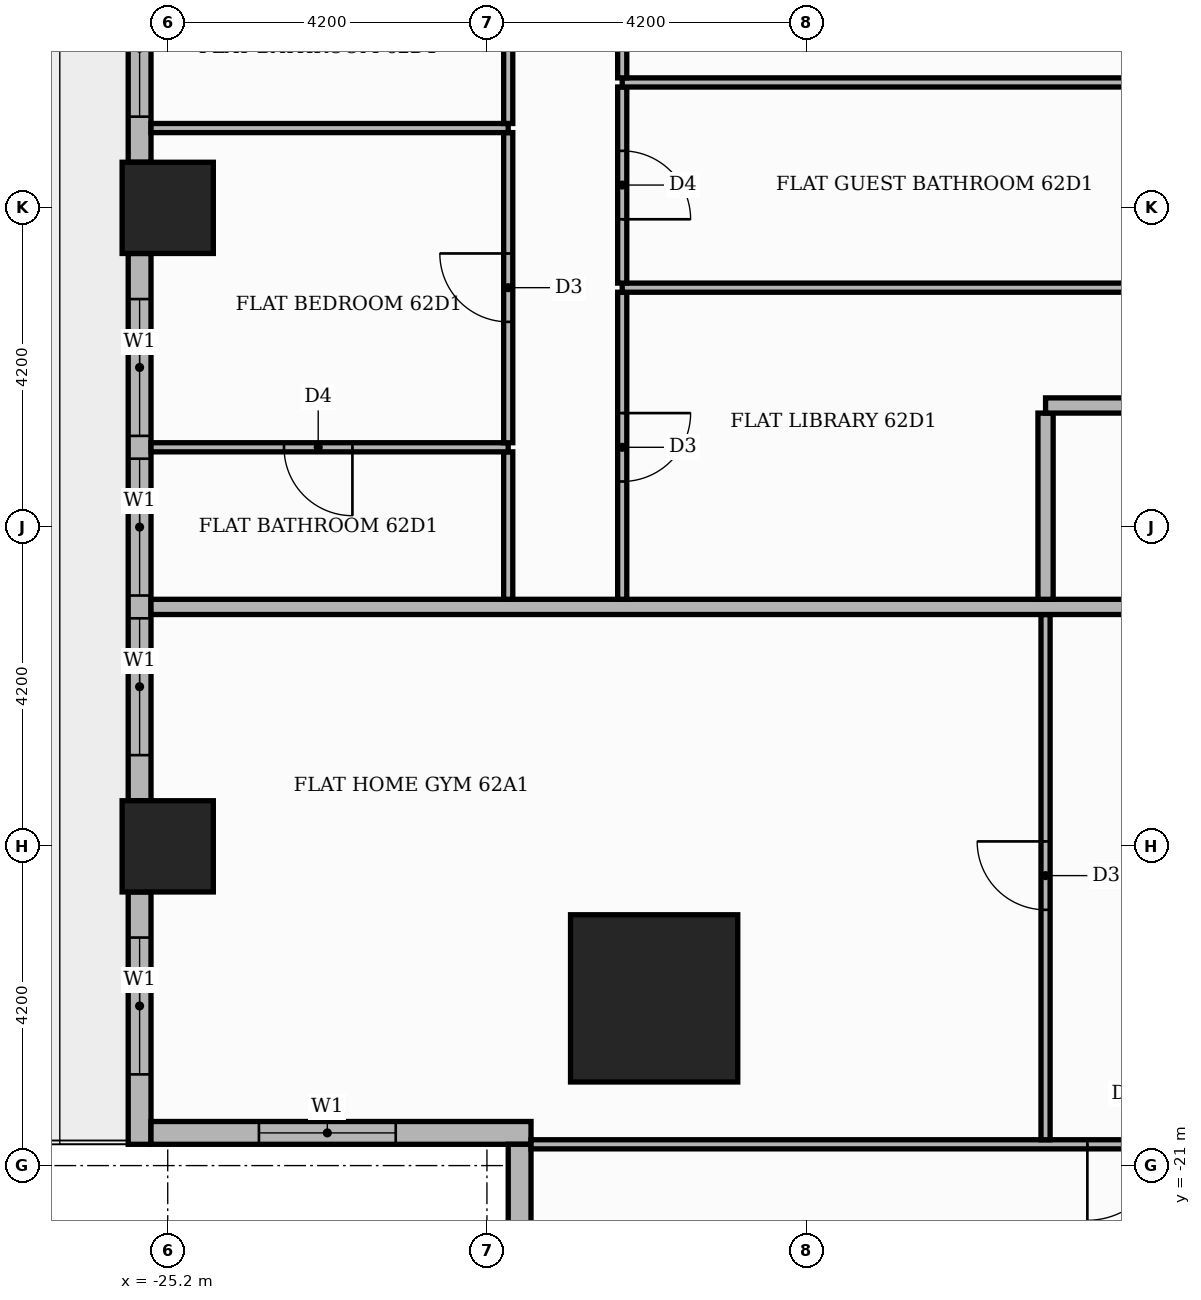
"""IFC4 building model, lengths in metres.
Left out: names, types, materials, properties, quantities, classifications, styles, units other than length and angle.
Written with IfcOpenShell. Run it as: python <this file> out.ifc"""

import sys

from ifc_helpers import new_model, si_unit, direction, frame, frame_2d, origin, origin_2d, place, context, subcontext, project, spatial, rectangle, extrude, element, fill, save


model = new_model("IFC4")
c1 = context("Model", 3, precision=1e-05, world=origin(), true_north=direction((0.0, 1.0)))
c2 = subcontext(c1, "Body", "Model", "MODEL_VIEW")
j1 = project(units=[si_unit("LENGTHUNIT", "METRE"), si_unit("PLANEANGLEUNIT", "RADIAN")], contexts=[c1])
p1 = place(None, origin())
s1 = spatial("IfcSite", under=j1, at=p1, CompositionType="ELEMENT")
p2 = place(p1, origin())
s2 = spatial("IfcBuilding", under=s1, at=p2, CompositionType="ELEMENT")
p3 = place(p2, frame((0.0, 0.0, 260.1)))
s3 = spatial("IfcBuildingStorey", under=s2, at=p3, CompositionType="ELEMENT", Elevation=260.1)
p4 = place(p3, frame((-18.8, -18.8, 0.0), z_axis=(0.0, 0.0, 1.0), x_axis=(1.0, 0.0, 0.0)))
e1 = element("IfcColumn", 1, at=p4, inside=s3, PredefinedType="COLUMN", context=c2, shape_type="SweptSolid", body=[
    extrude(rectangle(XDim=2.2, YDim=2.2, at=origin_2d()), origin(), (0.0, 0.0, 1.0), 3.9),
])
for number, where, z_axis, x_axis in (
    (2, (-25.2, -8.4, 0.0), (0.0, 0.0, 1.0), (1.0, 0.0, 0.0)),
    (3, (-25.2, -16.8, 0.0), (0.0, 0.0, 1.0), (1.0, 0.0, 0.0)),
):
    element("IfcColumn", number, at=place(p3, frame(where, z_axis=z_axis, x_axis=x_axis)), inside=s3, PredefinedType="COLUMN", context=c2, shape_type="SweptSolid", body=[
        extrude(rectangle(XDim=1.2, YDim=1.2, at=origin_2d()), origin(), (0.0, 0.0, 1.0), 3.9),
    ])
p5 = place(p3, frame((-25.57, -0.6, 0.0), z_axis=(0.0, 0.0, 1.0), x_axis=(0.0, -1.0, 0.0)))
e4 = element("IfcWall", 4, at=p5, inside=s3, PredefinedType="STANDARD", context=c2, shape_type="SweptSolid", body=[
    extrude(rectangle(XDim=7.2, YDim=0.3, at=frame_2d((3.6, 0.0))), origin(), (0.0, 0.0, 1.0), 3.48),
])
p6 = place(p5, frame((0.6, 0.0, 0.9)))
e5 = element("IfcOpeningElement", 5, at=p6, cuts=e4, PredefinedType="OPENING", context=c2, shape_type="SweptSolid", body=[
    extrude(rectangle(XDim=3.9, YDim=2.1, at=frame_2d((1.95, 1.05))), frame((0.0, 0.16, 0.0), z_axis=(0.0, -1.0, 0.0), x_axis=(1.0, 0.0, 0.0)), (0.0, 0.0, 1.0), 0.32),
])
p7 = place(p5, frame((4.8, 0.0, 0.9)))
e6 = element("IfcOpeningElement", 6, at=p7, cuts=e4, PredefinedType="OPENING", context=c2, shape_type="SweptSolid", body=[
    extrude(rectangle(XDim=1.8, YDim=2.1, at=frame_2d((0.9, 1.05))), frame((0.0, 0.16, 0.0), z_axis=(0.0, -1.0, 0.0), x_axis=(1.0, 0.0, 0.0)), (0.0, 0.0, 1.0), 0.32),
])
p8 = place(p3, frame((-25.57, -9.0, 0.0), z_axis=(0.0, 0.0, 1.0), x_axis=(0.0, -1.0, 0.0)))
e7 = element("IfcWall", 7, at=p8, inside=s3, PredefinedType="STANDARD", context=c2, shape_type="SweptSolid", body=[
    extrude(rectangle(XDim=7.2, YDim=0.3, at=frame_2d((3.6, 0.0))), origin(), (0.0, 0.0, 1.0), 3.48),
])
p9 = place(p8, frame((0.6, 0.0, 0.9)))
e8 = element("IfcOpeningElement", 8, at=p9, cuts=e7, PredefinedType="OPENING", context=c2, shape_type="SweptSolid", body=[
    extrude(rectangle(XDim=1.8, YDim=2.1, at=frame_2d((0.9, 1.05))), frame((0.0, 0.16, 0.0), z_axis=(0.0, -1.0, 0.0), x_axis=(1.0, 0.0, 0.0)), (0.0, 0.0, 1.0), 0.32),
])
p10 = place(p8, frame((2.7, 0.0, 0.9)))
e9 = element("IfcOpeningElement", 9, at=p10, cuts=e7, PredefinedType="OPENING", context=c2, shape_type="SweptSolid", body=[
    extrude(rectangle(XDim=1.8, YDim=2.1, at=frame_2d((0.9, 1.05))), frame((0.0, 0.16, 0.0), z_axis=(0.0, -1.0, 0.0), x_axis=(1.0, 0.0, 0.0)), (0.0, 0.0, 1.0), 0.32),
])
p11 = place(p8, frame((4.8, 0.0, 0.9)))
e10 = element("IfcOpeningElement", 10, at=p11, cuts=e7, PredefinedType="OPENING", context=c2, shape_type="SweptSolid", body=[
    extrude(rectangle(XDim=1.8, YDim=2.1, at=frame_2d((0.9, 1.05))), frame((0.0, 0.16, 0.0), z_axis=(0.0, -1.0, 0.0), x_axis=(1.0, 0.0, 0.0)), (0.0, 0.0, 1.0), 0.32),
])
p12 = place(p3, frame((-25.57, -17.4, 0.0), z_axis=(0.0, 0.0, 1.0), x_axis=(0.0, -1.0, 0.0)))
e11 = element("IfcWall", 11, at=p12, inside=s3, PredefinedType="STANDARD", context=c2, shape_type="SweptSolid", body=[
    extrude(rectangle(XDim=3.32, YDim=0.3, at=frame_2d((1.66, 0.0))), origin(), (0.0, 0.0, 1.0), 3.48),
])
p13 = place(p12, frame((0.6, 0.0, 0.9)))
e12 = element("IfcOpeningElement", 12, at=p13, cuts=e11, PredefinedType="OPENING", context=c2, shape_type="SweptSolid", body=[
    extrude(rectangle(XDim=1.8, YDim=2.1, at=frame_2d((0.9, 1.05))), frame((0.0, 0.16, 0.0), z_axis=(0.0, -1.0, 0.0), x_axis=(1.0, 0.0, 0.0)), (0.0, 0.0, 1.0), 0.32),
])
p14 = place(p3, frame((-25.42, -20.57, 0.0), z_axis=(0.0, 0.0, 1.0), x_axis=(1.0, 0.0, 0.0)))
e13 = element("IfcWall", 13, at=p14, inside=s3, PredefinedType="STANDARD", context=c2, shape_type="SweptSolid", body=[
    extrude(rectangle(XDim=5.0, YDim=0.3, at=frame_2d((2.5, 0.0))), origin(), (0.0, 0.0, 1.0), 3.48),
])
p15 = place(p14, frame((1.42, 0.0, 0.9)))
e14 = element("IfcOpeningElement", 14, at=p15, cuts=e13, PredefinedType="OPENING", context=c2, shape_type="SweptSolid", body=[
    extrude(rectangle(XDim=1.8, YDim=2.1, at=frame_2d((0.9, 1.05))), frame((0.0, 0.16, 0.0), z_axis=(0.0, -1.0, 0.0), x_axis=(1.0, 0.0, 0.0)), (0.0, 0.0, 1.0), 0.32),
])
p16 = place(p3, frame((-20.57, -20.72, 0.0), z_axis=(0.0, 0.0, 1.0), x_axis=(0.0, -1.0, 0.0)))
e15 = element("IfcWall", 15, at=p16, inside=s3, PredefinedType="STANDARD", context=c2, shape_type="SweptSolid", body=[
    extrude(rectangle(XDim=5.0, YDim=0.3, at=frame_2d((2.5, 0.0))), origin(), (0.0, 0.0, 1.0), 3.48),
])
p17 = place(p16, frame((1.48, 0.0, 0.9)))
e16 = element("IfcOpeningElement", 16, at=p17, cuts=e15, PredefinedType="OPENING", context=c2, shape_type="SweptSolid", body=[
    extrude(rectangle(XDim=1.8, YDim=2.1, at=frame_2d((0.9, 1.05))), frame((0.0, 0.16, 0.0), z_axis=(0.0, -1.0, 0.0), x_axis=(1.0, 0.0, 0.0)), (0.0, 0.0, 1.0), 0.32),
])
p18 = place(p3, frame((-20.42, -20.72, 0.0), z_axis=(0.0, 0.0, 1.0), x_axis=(1.0, 0.0, 0.0)))
e17 = element("IfcWall", 17, at=p18, inside=s3, PredefinedType="PARTITIONING", context=c2, shape_type="SweptSolid", body=[
    extrude(rectangle(XDim=12.77, YDim=0.12, at=frame_2d((6.385, 0.0))), origin(), (0.0, 0.0, 1.0), 3.48),
])
p19 = place(p18, frame((7.32, 0.0, 0.0)))
e18 = element("IfcOpeningElement", 18, at=p19, cuts=e17, PredefinedType="OPENING", context=c2, shape_type="SweptSolid", body=[
    extrude(rectangle(XDim=1.0, YDim=2.1, at=frame_2d((0.5, 1.05))), frame((0.0, 0.07, 0.0), z_axis=(0.0, -1.0, 0.0), x_axis=(1.0, 0.0, 0.0)), (0.0, 0.0, 1.0), 0.14),
])
p20 = place(p18, frame((10.47, 0.0, 0.0)))
e19 = element("IfcOpeningElement", 19, at=p20, cuts=e17, PredefinedType="OPENING", context=c2, shape_type="SweptSolid", body=[
    extrude(rectangle(XDim=1.0, YDim=2.1, at=frame_2d((0.5, 1.05))), frame((0.0, 0.07, 0.0), z_axis=(0.0, -1.0, 0.0), x_axis=(1.0, 0.0, 0.0)), (0.0, 0.0, 1.0), 0.14),
])
p21 = place(p3, frame((-13.65, -20.66, 0.0), z_axis=(0.0, 0.0, 1.0), x_axis=(0.0, 1.0, 0.0)))
e20 = element("IfcWall", 20, at=p21, inside=s3, PredefinedType="PARTITIONING", context=c2, shape_type="SweptSolid", body=[
    extrude(rectangle(XDim=6.91, YDim=0.12, at=frame_2d((3.455, 0.0))), origin(), (0.0, 0.0, 1.0), 3.48),
])
p22 = place(p21, frame((3.025, 0.0, 0.0)))
e21 = element("IfcOpeningElement", 21, at=p22, cuts=e20, PredefinedType="OPENING", context=c2, shape_type="SweptSolid", body=[
    extrude(rectangle(XDim=0.9, YDim=2.1, at=frame_2d((0.45, 1.05))), frame((0.0, 0.07, 0.0), z_axis=(0.0, -1.0, 0.0), x_axis=(1.0, 0.0, 0.0)), (0.0, 0.0, 1.0), 0.14),
])
p23 = place(p3, frame((-25.42, -13.65, 0.0), z_axis=(0.0, 0.0, 1.0), x_axis=(1.0, 0.0, 0.0)))
e22 = element("IfcWall", 22, at=p23, inside=s3, PredefinedType="PARTITIONING", context=c2, shape_type="SweptSolid", body=[
    extrude(rectangle(XDim=39.07, YDim=0.2, at=frame_2d((19.535, 0.0))), origin(), (0.0, 0.0, 1.0), 3.48),
])
p24 = place(p23, frame((14.37, 0.0, 0.0)))
e23 = element("IfcOpeningElement", 23, at=p24, cuts=e22, PredefinedType="OPENING", context=c2, shape_type="SweptSolid", body=[
    extrude(rectangle(XDim=1.1, YDim=2.4, at=frame_2d((0.55, 1.2))), frame((0.0, 0.11, 0.0), z_axis=(0.0, -1.0, 0.0), x_axis=(1.0, 0.0, 0.0)), (0.0, 0.0, 1.0), 0.22),
])
p25 = place(p3, frame((-20.72, -13.55, 0.0), z_axis=(0.0, 0.0, 1.0), x_axis=(0.0, 1.0, 0.0)))
e24 = element("IfcWall", 24, at=p25, inside=s3, PredefinedType="PARTITIONING", context=c2, shape_type="SweptSolid", body=[
    extrude(rectangle(XDim=1.94, YDim=0.12, at=frame_2d((0.97, 0.0))), origin(), (0.0, 0.0, 1.0), 3.48),
])
p26 = place(p3, frame((-19.22, -13.55, 0.0), z_axis=(0.0, 0.0, 1.0), x_axis=(0.0, 1.0, 0.0)))
e25 = element("IfcWall", 25, at=p26, inside=s3, PredefinedType="PARTITIONING", context=c2, shape_type="SweptSolid", body=[
    extrude(rectangle(XDim=4.04, YDim=0.12, at=frame_2d((2.02, 0.0))), origin(), (0.0, 0.0, 1.0), 3.48),
])
p27 = place(p26, frame((1.55, 0.0, 0.0)))
e26 = element("IfcOpeningElement", 26, at=p27, cuts=e25, PredefinedType="OPENING", context=c2, shape_type="SweptSolid", body=[
    extrude(rectangle(XDim=0.9, YDim=2.1, at=frame_2d((0.45, 1.05))), frame((0.0, 0.07, 0.0), z_axis=(0.0, -1.0, 0.0), x_axis=(1.0, 0.0, 0.0)), (0.0, 0.0, 1.0), 0.14),
])
p28 = place(p3, frame((-13.65, -13.55, 0.0), z_axis=(0.0, 0.0, 1.0), x_axis=(0.0, 1.0, 0.0)))
e27 = element("IfcWall", 27, at=p28, inside=s3, PredefinedType="PARTITIONING", context=c2, shape_type="SweptSolid", body=[
    extrude(rectangle(XDim=2.45, YDim=0.2, at=frame_2d((1.225, 0.0))), origin(), (0.0, 0.0, 1.0), 3.48),
])
p29 = place(p3, frame((-25.42, -11.55, 0.0), z_axis=(0.0, 0.0, 1.0), x_axis=(1.0, 0.0, 0.0)))
e28 = element("IfcWall", 28, at=p29, inside=s3, PredefinedType="PARTITIONING", context=c2, shape_type="SweptSolid", body=[
    extrude(rectangle(XDim=4.7, YDim=0.12, at=frame_2d((2.35, 0.0))), origin(), (0.0, 0.0, 1.0), 3.48),
])
p30 = place(p29, frame((1.75, 0.0, 0.0)))
e29 = element("IfcOpeningElement", 29, at=p30, cuts=e28, PredefinedType="OPENING", context=c2, shape_type="SweptSolid", body=[
    extrude(rectangle(XDim=0.9, YDim=2.1, at=frame_2d((0.45, 1.05))), frame((0.0, 0.07, 0.0), z_axis=(0.0, -1.0, 0.0), x_axis=(1.0, 0.0, 0.0)), (0.0, 0.0, 1.0), 0.14),
])
p31 = place(p3, frame((-20.72, -11.49, 0.0), z_axis=(0.0, 0.0, 1.0), x_axis=(0.0, 1.0, 0.0)))
e30 = element("IfcWall", 30, at=p31, inside=s3, PredefinedType="PARTITIONING", context=c2, shape_type="SweptSolid", body=[
    extrude(rectangle(XDim=4.08, YDim=0.12, at=frame_2d((2.04, 0.0))), origin(), (0.0, 0.0, 1.0), 3.48),
])
p32 = place(p31, frame((1.59, 0.0, 0.0)))
e31 = element("IfcOpeningElement", 31, at=p32, cuts=e30, PredefinedType="OPENING", context=c2, shape_type="SweptSolid", body=[
    extrude(rectangle(XDim=0.9, YDim=2.1, at=frame_2d((0.45, 1.05))), frame((0.0, 0.07, 0.0), z_axis=(0.0, -1.0, 0.0), x_axis=(1.0, 0.0, 0.0)), (0.0, 0.0, 1.0), 0.14),
])
p33 = place(p3, frame((-13.65, -11.0, 0.0), z_axis=(0.0, 0.0, 1.0), x_axis=(1.0, 0.0, 0.0)))
e32 = element("IfcWall", 32, at=p33, inside=s3, PredefinedType="PARTITIONING", context=c2, shape_type="SweptSolid", body=[
    extrude(rectangle(XDim=2.65, YDim=0.2, at=frame_2d((1.325, 0.0))), origin(), (0.0, 0.0, 1.0), 3.48),
])
p34 = place(p3, frame((-19.22, -9.45, 0.0), z_axis=(0.0, 0.0, 1.0), x_axis=(1.0, 0.0, 0.0)))
e33 = element("IfcWall", 33, at=p34, inside=s3, PredefinedType="PARTITIONING", context=c2, shape_type="SweptSolid", body=[
    extrude(rectangle(XDim=8.22, YDim=0.12, at=frame_2d((4.11, 0.0))), origin(), (0.0, 0.0, 1.0), 3.48),
])
p35 = place(p3, frame((-19.22, -9.39, 0.0), z_axis=(0.0, 0.0, 1.0), x_axis=(0.0, 1.0, 0.0)))
e34 = element("IfcWall", 34, at=p35, inside=s3, PredefinedType="PARTITIONING", context=c2, shape_type="SweptSolid", body=[
    extrude(rectangle(XDim=2.58, YDim=0.12, at=frame_2d((1.29, 0.0))), origin(), (0.0, 0.0, 1.0), 3.48),
])
p36 = place(p35, frame((0.84, 0.0, 0.0)))
e35 = element("IfcOpeningElement", 35, at=p36, cuts=e34, PredefinedType="OPENING", context=c2, shape_type="SweptSolid", body=[
    extrude(rectangle(XDim=0.9, YDim=2.1, at=frame_2d((0.45, 1.05))), frame((0.0, 0.07, 0.0), z_axis=(0.0, -1.0, 0.0), x_axis=(1.0, 0.0, 0.0)), (0.0, 0.0, 1.0), 0.14),
])
p37 = place(p3, frame((-25.42, -7.35, 0.0), z_axis=(0.0, 0.0, 1.0), x_axis=(1.0, 0.0, 0.0)))
e36 = element("IfcWall", 36, at=p37, inside=s3, PredefinedType="PARTITIONING", context=c2, shape_type="SweptSolid", body=[
    extrude(rectangle(XDim=4.7, YDim=0.12, at=frame_2d((2.35, 0.0))), origin(), (0.0, 0.0, 1.0), 3.48),
])
p38 = place(p3, frame((-20.72, -7.29, 0.0), z_axis=(0.0, 0.0, 1.0), x_axis=(0.0, 1.0, 0.0)))
e37 = element("IfcWall", 37, at=p38, inside=s3, PredefinedType="PARTITIONING", context=c2, shape_type="SweptSolid", body=[
    extrude(rectangle(XDim=1.98, YDim=0.12, at=frame_2d((0.99, 0.0))), origin(), (0.0, 0.0, 1.0), 3.48),
])
p39 = place(p3, frame((-19.22, -6.75, 0.0), z_axis=(0.0, 0.0, 1.0), x_axis=(1.0, 0.0, 0.0)))
e38 = element("IfcWall", 38, at=p39, inside=s3, PredefinedType="PARTITIONING", context=c2, shape_type="SweptSolid", body=[
    extrude(rectangle(XDim=8.22, YDim=0.12, at=frame_2d((4.11, 0.0))), origin(), (0.0, 0.0, 1.0), 3.48),
])
p40 = place(p3, frame((-19.22, -6.69, 0.0), z_axis=(0.0, 0.0, 1.0), x_axis=(0.0, 1.0, 0.0)))
e39 = element("IfcWall", 39, at=p40, inside=s3, PredefinedType="PARTITIONING", context=c2, shape_type="SweptSolid", body=[
    extrude(rectangle(XDim=3.18, YDim=0.12, at=frame_2d((1.59, 0.0))), origin(), (0.0, 0.0, 1.0), 3.48),
])
p41 = place(p40, frame((1.14, 0.0, 0.0)))
e40 = element("IfcOpeningElement", 40, at=p41, cuts=e39, PredefinedType="OPENING", context=c2, shape_type="SweptSolid", body=[
    extrude(rectangle(XDim=0.9, YDim=2.1, at=frame_2d((0.45, 1.05))), frame((0.0, 0.07, 0.0), z_axis=(0.0, -1.0, 0.0), x_axis=(1.0, 0.0, 0.0)), (0.0, 0.0, 1.0), 0.14),
])
p42 = place(p7, origin())
e41 = element("IfcWindow", 41, at=p42, inside=s3, PartitioningType="SINGLE_PANEL", PredefinedType="WINDOW", context=c2, shape_type="SweptSolid", body=[
    extrude(rectangle(XDim=1.8, YDim=2.1, at=frame_2d((0.9, 1.05))), frame((0.0, 0.03, 0.0), z_axis=(0.0, -1.0, 0.0), x_axis=(1.0, 0.0, 0.0)), (0.0, 0.0, 1.0), 0.06),
])
fill(e6, e41)
p43 = place(p9, origin())
e42 = element("IfcWindow", 42, at=p43, inside=s3, PartitioningType="SINGLE_PANEL", PredefinedType="WINDOW", context=c2, shape_type="SweptSolid", body=[
    extrude(rectangle(XDim=1.8, YDim=2.1, at=frame_2d((0.9, 1.05))), frame((0.0, 0.03, 0.0), z_axis=(0.0, -1.0, 0.0), x_axis=(1.0, 0.0, 0.0)), (0.0, 0.0, 1.0), 0.06),
])
fill(e8, e42)
p44 = place(p10, origin())
e43 = element("IfcWindow", 43, at=p44, inside=s3, PartitioningType="SINGLE_PANEL", PredefinedType="WINDOW", context=c2, shape_type="SweptSolid", body=[
    extrude(rectangle(XDim=1.8, YDim=2.1, at=frame_2d((0.9, 1.05))), frame((0.0, 0.03, 0.0), z_axis=(0.0, -1.0, 0.0), x_axis=(1.0, 0.0, 0.0)), (0.0, 0.0, 1.0), 0.06),
])
fill(e9, e43)
p45 = place(p11, origin())
e44 = element("IfcWindow", 44, at=p45, inside=s3, PartitioningType="SINGLE_PANEL", PredefinedType="WINDOW", context=c2, shape_type="SweptSolid", body=[
    extrude(rectangle(XDim=1.8, YDim=2.1, at=frame_2d((0.9, 1.05))), frame((0.0, 0.03, 0.0), z_axis=(0.0, -1.0, 0.0), x_axis=(1.0, 0.0, 0.0)), (0.0, 0.0, 1.0), 0.06),
])
fill(e10, e44)
p46 = place(p13, origin())
e45 = element("IfcWindow", 45, at=p46, inside=s3, PartitioningType="SINGLE_PANEL", PredefinedType="WINDOW", context=c2, shape_type="SweptSolid", body=[
    extrude(rectangle(XDim=1.8, YDim=2.1, at=frame_2d((0.9, 1.05))), frame((0.0, 0.03, 0.0), z_axis=(0.0, -1.0, 0.0), x_axis=(1.0, 0.0, 0.0)), (0.0, 0.0, 1.0), 0.06),
])
fill(e12, e45)
p47 = place(p15, origin())
e46 = element("IfcWindow", 46, at=p47, inside=s3, PartitioningType="SINGLE_PANEL", PredefinedType="WINDOW", context=c2, shape_type="SweptSolid", body=[
    extrude(rectangle(XDim=1.8, YDim=2.1, at=frame_2d((0.9, 1.05))), frame((0.0, 0.03, 0.0), z_axis=(0.0, -1.0, 0.0), x_axis=(1.0, 0.0, 0.0)), (0.0, 0.0, 1.0), 0.06),
])
fill(e14, e46)
p48 = place(p22, origin())
e47 = element("IfcDoor", 47, at=p48, inside=s3, OperationType="SINGLE_SWING_RIGHT", PredefinedType="DOOR", context=c2, shape_type="SweptSolid", body=[
    extrude(rectangle(XDim=0.9, YDim=2.1, at=frame_2d((0.45, 1.05))), frame((0.0, 0.025, 0.0), z_axis=(0.0, -1.0, 0.0), x_axis=(1.0, 0.0, 0.0)), (0.0, 0.0, 1.0), 0.05),
])
fill(e21, e47)
p49 = place(p19, frame((1.0, 0.0, 0.0), z_axis=(0.0, 0.0, 1.0), x_axis=(-1.0, 0.0, 0.0)))
e48 = element("IfcDoor", 48, at=p49, inside=s3, OperationType="SINGLE_SWING_LEFT", PredefinedType="DOOR", context=c2, shape_type="SweptSolid", body=[
    extrude(rectangle(XDim=1.0, YDim=2.1, at=frame_2d((0.5, 1.05))), frame((0.0, 0.025, 0.0), z_axis=(0.0, -1.0, 0.0), x_axis=(1.0, 0.0, 0.0)), (0.0, 0.0, 1.0), 0.05),
])
fill(e18, e48)
p50 = place(p36, frame((0.9, 0.0, 0.0), z_axis=(0.0, 0.0, 1.0), x_axis=(-1.0, 0.0, 0.0)))
e49 = element("IfcDoor", 49, at=p50, inside=s3, OperationType="SINGLE_SWING_LEFT", PredefinedType="DOOR", context=c2, shape_type="SweptSolid", body=[
    extrude(rectangle(XDim=0.9, YDim=2.1, at=frame_2d((0.45, 1.05))), frame((0.0, 0.025, 0.0), z_axis=(0.0, -1.0, 0.0), x_axis=(1.0, 0.0, 0.0)), (0.0, 0.0, 1.0), 0.05),
])
fill(e35, e49)
p51 = place(p27, frame((0.9, 0.0, 0.0), z_axis=(0.0, 0.0, 1.0), x_axis=(-1.0, 0.0, 0.0)))
e50 = element("IfcDoor", 50, at=p51, inside=s3, OperationType="SINGLE_SWING_RIGHT", PredefinedType="DOOR", context=c2, shape_type="SweptSolid", body=[
    extrude(rectangle(XDim=0.9, YDim=2.1, at=frame_2d((0.45, 1.05))), frame((0.0, 0.025, 0.0), z_axis=(0.0, -1.0, 0.0), x_axis=(1.0, 0.0, 0.0)), (0.0, 0.0, 1.0), 0.05),
])
fill(e26, e50)
p52 = place(p32, origin())
e51 = element("IfcDoor", 51, at=p52, inside=s3, OperationType="SINGLE_SWING_RIGHT", PredefinedType="DOOR", context=c2, shape_type="SweptSolid", body=[
    extrude(rectangle(XDim=0.9, YDim=2.1, at=frame_2d((0.45, 1.05))), frame((0.0, 0.025, 0.0), z_axis=(0.0, -1.0, 0.0), x_axis=(1.0, 0.0, 0.0)), (0.0, 0.0, 1.0), 0.05),
])
fill(e31, e51)
p53 = place(p30, frame((0.9, 0.0, 0.0), z_axis=(0.0, 0.0, 1.0), x_axis=(-1.0, 0.0, 0.0)))
e52 = element("IfcDoor", 52, at=p53, inside=s3, OperationType="SINGLE_SWING_RIGHT", PredefinedType="DOOR", context=c2, shape_type="SweptSolid", body=[
    extrude(rectangle(XDim=0.9, YDim=2.1, at=frame_2d((0.45, 1.05))), frame((0.0, 0.025, 0.0), z_axis=(0.0, -1.0, 0.0), x_axis=(1.0, 0.0, 0.0)), (0.0, 0.0, 1.0), 0.05),
])
fill(e29, e52)
save(model, sys.argv[1])
